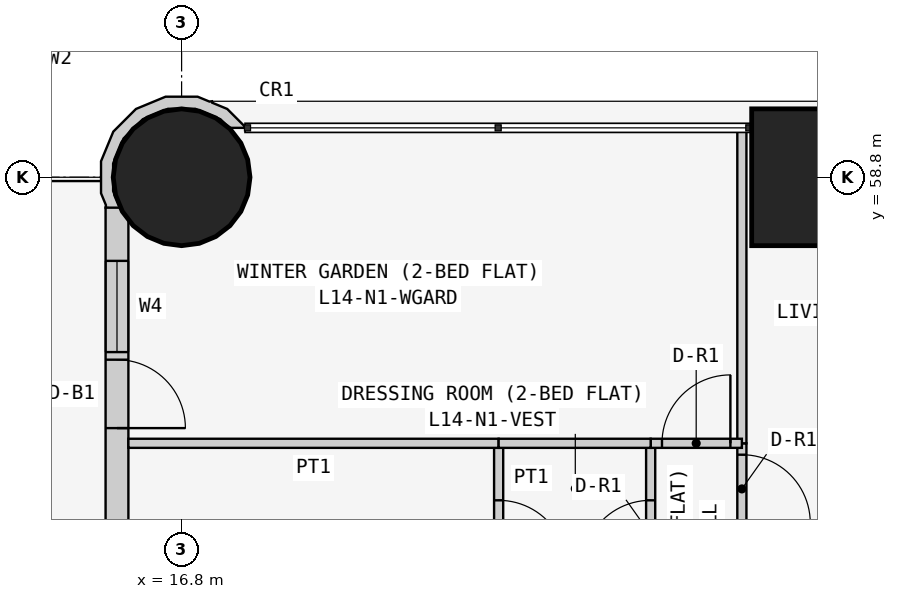
"""IFC4 building model, lengths in metres.
Left out: names, types, materials, properties, quantities, classifications, styles, units other than length and angle.
Written with IfcOpenShell. Run it as: python <this file> out.ifc"""

import sys

from ifc_helpers import new_model, si_unit, direction, frame, frame_2d, origin, origin_2d, place, context, subcontext, project, spatial, polyline, rectangle, circle, outline, extrude, element, fill, save


model = new_model("IFC4")
c1 = context("Model", 3, precision=1e-05, world=origin(), true_north=direction((0.0, 1.0)))
c2 = subcontext(c1, "Body", "Model", "MODEL_VIEW")
j1 = project(units=[si_unit("LENGTHUNIT", "METRE"), si_unit("PLANEANGLEUNIT", "RADIAN")], contexts=[c1])
p1 = place(None, origin())
s1 = spatial("IfcSite", under=j1, at=p1, CompositionType="ELEMENT")
p2 = place(p1, origin())
s2 = spatial("IfcBuilding", under=s1, at=p2, CompositionType="ELEMENT")
p3 = place(p2, frame((0.0, 0.0, 59.7)))
s3 = spatial("IfcBuildingStorey", under=s2, at=p3, CompositionType="ELEMENT", Elevation=59.7)
p4 = place(p3, frame((16.8, 58.8, 0.0), z_axis=(0.0, 0.0, 1.0), x_axis=(1.0, 0.0, 0.0)))
e1 = element("IfcColumn", 1, at=p4, inside=s3, PredefinedType="COLUMN", context=c2, shape_type="SweptSolid", body=[
    extrude(circle(Radius=0.9, at=origin_2d()), origin(), (0.0, 0.0, 1.0), 3.6),
])
p5 = place(p3, frame((25.2, 58.8, 0.0), z_axis=(0.0, 0.0, 1.0), x_axis=(1.0, 0.0, 0.0)))
e2 = element("IfcColumn", 2, at=p5, inside=s3, PredefinedType="COLUMN", context=c2, shape_type="SweptSolid", body=[
    extrude(rectangle(XDim=1.8, YDim=1.8, at=origin_2d()), origin(), (0.0, 0.0, 1.0), 3.6),
])
p6 = place(p3, frame((15.95, 58.4, 0.0), z_axis=(0.0, 0.0, 1.0), x_axis=(0.0, -1.0, 0.0)))
e3 = element("IfcWall", 3, at=p6, inside=s3, PredefinedType="SOLIDWALL", context=c2, shape_type="SweptSolid", body=[
    extrude(rectangle(XDim=15.7, YDim=0.3, at=frame_2d((7.85, 0.0))), origin(), (0.0, 0.0, 1.0), 3.45),
])
p7 = place(p6, frame((12.4, 0.0, 0.9)))
e4 = element("IfcOpeningElement", 4, at=p7, cuts=e3, PredefinedType="OPENING", context=c2, shape_type="SweptSolid", body=[
    extrude(rectangle(XDim=1.8, YDim=1.5, at=frame_2d((0.9, 0.75))), frame((0.0, 0.16, 0.0), z_axis=(0.0, -1.0, 0.0), x_axis=(1.0, 0.0, 0.0)), (0.0, 0.0, 1.0), 0.32),
])
p8 = place(p6, frame((9.55, 0.0, 1.5)))
e5 = element("IfcOpeningElement", 5, at=p8, cuts=e3, PredefinedType="OPENING", context=c2, shape_type="SweptSolid", body=[
    extrude(rectangle(XDim=0.9, YDim=0.7, at=frame_2d((0.45, 0.35))), frame((0.0, 0.16, 0.0), z_axis=(0.0, -1.0, 0.0), x_axis=(1.0, 0.0, 0.0)), (0.0, 0.0, 1.0), 0.32),
])
p9 = place(p6, frame((5.1, 0.0, 0.9)))
e6 = element("IfcOpeningElement", 6, at=p9, cuts=e3, PredefinedType="OPENING", context=c2, shape_type="SweptSolid", body=[
    extrude(rectangle(XDim=1.8, YDim=1.5, at=frame_2d((0.9, 0.75))), frame((0.0, 0.16, 0.0), z_axis=(0.0, -1.0, 0.0), x_axis=(1.0, 0.0, 0.0)), (0.0, 0.0, 1.0), 0.32),
])
p10 = place(p6, frame((2.0, 0.0, 0.0)))
e7 = element("IfcOpeningElement", 7, at=p10, cuts=e3, PredefinedType="OPENING", context=c2, shape_type="SweptSolid", body=[
    extrude(rectangle(XDim=0.9, YDim=2.4, at=frame_2d((0.45, 1.2))), frame((0.0, 0.16, 0.0), z_axis=(0.0, -1.0, 0.0), x_axis=(1.0, 0.0, 0.0)), (0.0, 0.0, 1.0), 0.32),
])
p11 = place(p6, frame((0.7, 0.0, 0.9)))
e8 = element("IfcOpeningElement", 8, at=p11, cuts=e3, PredefinedType="OPENING", context=c2, shape_type="SweptSolid", body=[
    extrude(rectangle(XDim=1.2, YDim=1.5, at=frame_2d((0.6, 0.75))), frame((0.0, 0.16, 0.0), z_axis=(0.0, -1.0, 0.0), x_axis=(1.0, 0.0, 0.0)), (0.0, 0.0, 1.0), 0.32),
])
p12 = place(p3, frame((17.567, 59.411, 0.0), z_axis=(0.0, 0.0, 1.0), x_axis=(-0.377204953059, 0.926129809145, 0.0)))
e9 = element("IfcWall", 9, at=p12, inside=s3, PredefinedType="SOLIDWALL", context=c2, shape_type="SweptSolid", body=[
    extrude(outline(polyline([(-0.27, 2.017), (-0.37, 1.841), (-0.102, 1.842), (0.23, 1.707), (0.484, 1.455), (0.624, 1.125), (0.626, 0.766), (0.491, 0.434), (0.239, 0.18), (0.09, 0.117), (0.011, -0.078), (0.024, -0.083), (0.329, 0.045), (0.48, 0.198), (0.499, 0.193), (0.508, 0.225), (0.626, 0.345), (0.785, 0.736), (0.782, 1.157), (0.619, 1.546), (0.319, 1.842), (-0.072, 2.002), (-0.24, 2.0), (-0.27, 2.017)])), origin(), (0.0, 0.0, 1.0), 3.45),
])
p13 = place(p3, frame((24.171, 55.3, 0.0), z_axis=(0.0, 0.0, 1.0), x_axis=(0.0, -1.0, 0.0)))
e10 = element("IfcWall", 10, at=p13, inside=s3, PredefinedType="PARTITIONING", context=c2, shape_type="SweptSolid", body=[
    extrude(rectangle(XDim=1.2, YDim=0.12, at=frame_2d((0.6, 0.0))), origin(), (0.0, 0.0, 1.0), 3.45),
])
p14 = place(p13, frame((0.15, 0.0, 0.0)))
e11 = element("IfcOpeningElement", 11, at=p14, cuts=e10, PredefinedType="OPENING", context=c2, shape_type="SweptSolid", body=[
    extrude(rectangle(XDim=0.9, YDim=2.1, at=frame_2d((0.45, 1.05))), frame((0.0, 0.07, 0.0), z_axis=(0.0, -1.0, 0.0), x_axis=(1.0, 0.0, 0.0)), (0.0, 0.0, 1.0), 0.14),
])
p15 = place(p3, frame((24.171, 59.45, 0.0), z_axis=(0.0, 0.0, 1.0), x_axis=(0.0, -1.0, 0.0)))
e12 = element("IfcWall", 12, at=p15, inside=s3, PredefinedType="PARTITIONING", context=c2, shape_type="SweptSolid", body=[
    extrude(rectangle(XDim=4.15, YDim=0.12, at=frame_2d((2.075, 0.0))), origin(), (0.0, 0.0, 1.0), 3.45),
])
p16 = place(p3, frame((22.971, 55.3, 0.0), z_axis=(0.0, 0.0, 1.0), x_axis=(0.0, -1.0, 0.0)))
e13 = element("IfcWall", 13, at=p16, inside=s3, PredefinedType="PARTITIONING", context=c2, shape_type="SweptSolid", body=[
    extrude(rectangle(XDim=2.3, YDim=0.12, at=frame_2d((1.15, 0.0))), origin(), (0.0, 0.0, 1.0), 3.45),
])
p17 = place(p16, frame((0.75, 0.0, 0.0)))
e14 = element("IfcOpeningElement", 14, at=p17, cuts=e13, PredefinedType="OPENING", context=c2, shape_type="SweptSolid", body=[
    extrude(rectangle(XDim=0.9, YDim=2.1, at=frame_2d((0.45, 1.05))), frame((0.0, 0.07, 0.0), z_axis=(0.0, -1.0, 0.0), x_axis=(1.0, 0.0, 0.0)), (0.0, 0.0, 1.0), 0.14),
])
p18 = place(p3, frame((24.171, 55.3, 0.0), z_axis=(0.0, 0.0, 1.0), x_axis=(-1.0, 0.0, 0.0)))
e15 = element("IfcWall", 15, at=p18, inside=s3, PredefinedType="PARTITIONING", context=c2, shape_type="SweptSolid", body=[
    extrude(rectangle(XDim=1.2, YDim=0.12, at=frame_2d((0.6, 0.0))), origin(), (0.0, 0.0, 1.0), 3.45),
])
p19 = place(p18, frame((0.151, 0.0, 0.0)))
e16 = element("IfcOpeningElement", 16, at=p19, cuts=e15, PredefinedType="OPENING", context=c2, shape_type="SweptSolid", body=[
    extrude(rectangle(XDim=0.9, YDim=2.1, at=frame_2d((0.45, 1.05))), frame((0.0, 0.07, 0.0), z_axis=(0.0, -1.0, 0.0), x_axis=(1.0, 0.0, 0.0)), (0.0, 0.0, 1.0), 0.14),
])
p20 = place(p3, frame((20.971, 55.3, 0.0), z_axis=(0.0, 0.0, 1.0), x_axis=(0.0, -1.0, 0.0)))
e17 = element("IfcWall", 17, at=p20, inside=s3, PredefinedType="PARTITIONING", context=c2, shape_type="SweptSolid", body=[
    extrude(rectangle(XDim=2.3, YDim=0.12, at=frame_2d((1.15, 0.0))), origin(), (0.0, 0.0, 1.0), 2.848),
])
p21 = place(p20, frame((0.75, 0.0, 0.0)))
e18 = element("IfcOpeningElement", 18, at=p21, cuts=e17, PredefinedType="OPENING", context=c2, shape_type="SweptSolid", body=[
    extrude(rectangle(XDim=0.9, YDim=2.1, at=frame_2d((0.45, 1.05))), frame((0.0, 0.07, 0.0), z_axis=(0.0, -1.0, 0.0), x_axis=(1.0, 0.0, 0.0)), (0.0, 0.0, 1.0), 0.14),
])
p22 = place(p3, frame((16.1, 55.3, 0.0), z_axis=(0.0, 0.0, 1.0), x_axis=(1.0, 0.0, 0.0)))
e19 = element("IfcWall", 19, at=p22, inside=s3, PredefinedType="PARTITIONING", context=c2, shape_type="SweptSolid", body=[
    extrude(rectangle(XDim=4.871, YDim=0.12, at=frame_2d((2.436, 0.0))), origin(), (0.0, 0.0, 1.0), 3.45),
])
p23 = place(p3, frame((22.971, 55.3, 0.0), z_axis=(0.0, 0.0, 1.0), x_axis=(-1.0, 0.0, 0.0)))
e20 = element("IfcWall", 20, at=p23, inside=s3, PredefinedType="PARTITIONING", context=c2, shape_type="SweptSolid", body=[
    extrude(rectangle(XDim=2.0, YDim=0.12, at=frame_2d((1.0, 0.0))), origin(), (0.0, 0.0, 1.0), 3.45),
])
p24 = place(p10, origin())
e21 = element("IfcDoor", 21, at=p24, inside=s3, OperationType="SINGLE_SWING_RIGHT", PredefinedType="DOOR", context=c2, shape_type="SweptSolid", body=[
    extrude(rectangle(XDim=0.9, YDim=2.4, at=frame_2d((0.45, 1.2))), frame((0.0, 0.025, 0.0), z_axis=(0.0, -1.0, 0.0), x_axis=(1.0, 0.0, 0.0)), (0.0, 0.0, 1.0), 0.05),
])
fill(e7, e21)
p25 = place(p11, origin())
e22 = element("IfcWindow", 22, at=p25, inside=s3, PartitioningType="SINGLE_PANEL", PredefinedType="WINDOW", context=c2, shape_type="SweptSolid", body=[
    extrude(rectangle(XDim=1.2, YDim=1.5, at=frame_2d((0.6, 0.75))), frame((0.0, 0.03, 0.0), z_axis=(0.0, -1.0, 0.0), x_axis=(1.0, 0.0, 0.0)), (0.0, 0.0, 1.0), 0.06),
])
fill(e8, e22)
p26 = place(p14, origin())
e23 = element("IfcDoor", 23, at=p26, inside=s3, OperationType="SINGLE_SWING_RIGHT", PredefinedType="DOOR", context=c2, shape_type="SweptSolid", body=[
    extrude(rectangle(XDim=0.9, YDim=2.1, at=frame_2d((0.45, 1.05))), frame((0.0, 0.025, 0.0), z_axis=(0.0, -1.0, 0.0), x_axis=(1.0, 0.0, 0.0)), (0.0, 0.0, 1.0), 0.05),
])
fill(e11, e23)
p27 = place(p17, frame((0.9, 0.0, 0.0), z_axis=(0.0, 0.0, 1.0), x_axis=(-1.0, 0.0, 0.0)))
e24 = element("IfcDoor", 24, at=p27, inside=s3, OperationType="SINGLE_SWING_LEFT", PredefinedType="DOOR", context=c2, shape_type="SweptSolid", body=[
    extrude(rectangle(XDim=0.9, YDim=2.1, at=frame_2d((0.45, 1.05))), frame((0.0, 0.025, 0.0), z_axis=(0.0, -1.0, 0.0), x_axis=(1.0, 0.0, 0.0)), (0.0, 0.0, 1.0), 0.05),
])
fill(e14, e24)
p28 = place(p21, origin())
e25 = element("IfcDoor", 25, at=p28, inside=s3, OperationType="SINGLE_SWING_RIGHT", PredefinedType="DOOR", context=c2, shape_type="SweptSolid", body=[
    extrude(rectangle(XDim=0.9, YDim=2.1, at=frame_2d((0.45, 1.05))), frame((0.0, 0.025, 0.0), z_axis=(0.0, -1.0, 0.0), x_axis=(1.0, 0.0, 0.0)), (0.0, 0.0, 1.0), 0.05),
])
fill(e18, e25)
p29 = place(p19, frame((0.9, 0.0, 0.0), z_axis=(0.0, 0.0, 1.0), x_axis=(-1.0, 0.0, 0.0)))
e26 = element("IfcDoor", 26, at=p29, inside=s3, OperationType="SINGLE_SWING_RIGHT", PredefinedType="DOOR", context=c2, shape_type="SweptSolid", body=[
    extrude(rectangle(XDim=0.9, YDim=2.1, at=frame_2d((0.45, 1.05))), frame((0.0, 0.025, 0.0), z_axis=(0.0, -1.0, 0.0), x_axis=(1.0, 0.0, 0.0)), (0.0, 0.0, 1.0), 0.05),
])
fill(e16, e26)
save(model, sys.argv[1])
